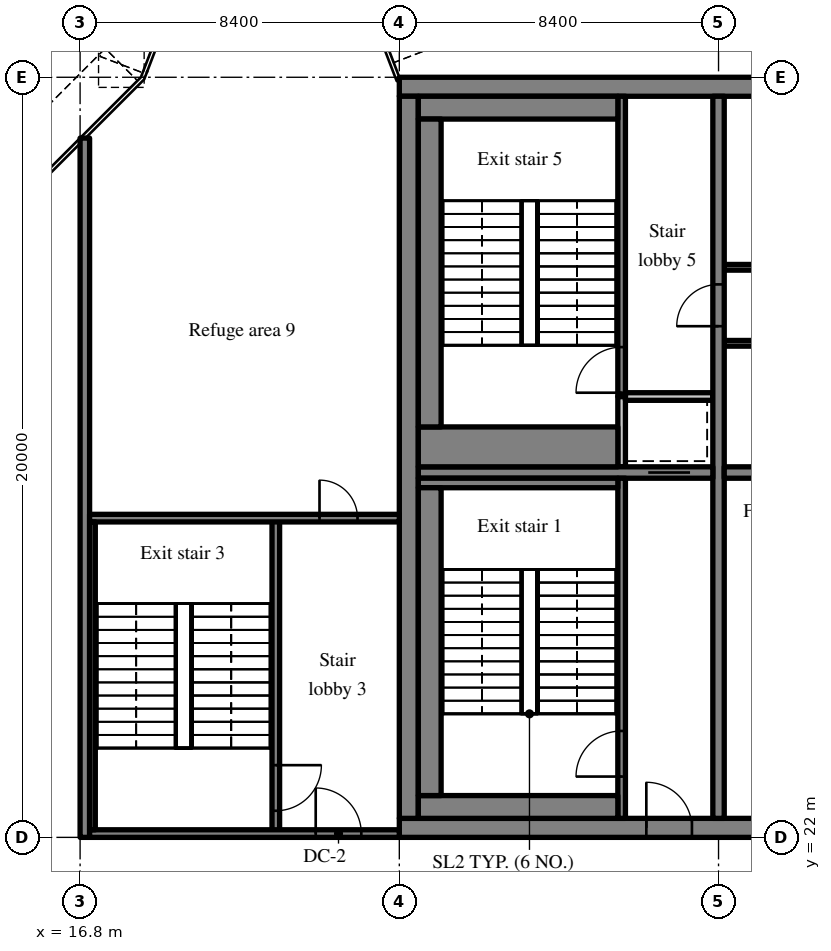
"""IFC4 building model, lengths in metres.
Left out: names, types, materials, properties, quantities, classifications, styles, units other than length and angle.
Written with IfcOpenShell. Run it as: python <this file> out.ifc"""

import sys

from ifc_helpers import new_model, si_unit, direction, frame, frame_2d, origin, place, context, subcontext, project, spatial, rectangle, extrude, source, transform, mapped, element, fill, save


model = new_model("IFC4")
c1 = context("Model", 3, precision=1e-05, world=origin(), true_north=direction((0.0, 1.0)))
c2 = subcontext(c1, "Body", "Model", "MODEL_VIEW")
j1 = project(units=[si_unit("LENGTHUNIT", "METRE"), si_unit("PLANEANGLEUNIT", "RADIAN")], contexts=[c1])
p1 = place(None, origin())
s1 = spatial("IfcSite", under=j1, at=p1, CompositionType="ELEMENT")
p2 = place(p1, origin())
s2 = spatial("IfcBuilding", under=s1, at=p2, CompositionType="ELEMENT")
p3 = place(p2, frame((0.0, 0.0, 270.1)))
s3 = spatial("IfcBuildingStorey", under=s2, at=p3, CompositionType="ELEMENT", Elevation=270.1)
m1 = source(origin(), c2, "Body", "SweptSolid", [
    extrude(rectangle(XDim=50.4, YDim=0.5, at=frame_2d((25.2, 0.0))), origin(), (0.0, 0.0, 1.0), 7.32),
])
p4 = place(p3, frame((25.2, 22.25, 0.0), z_axis=(0.0, 0.0, 1.0), x_axis=(1.0, 0.0, 0.0)))
e1 = element("IfcWall", 1, at=p4, inside=s3, PredefinedType="SHEAR", context=c2, shape_type="MappedRepresentation", body=[
    mapped(m1, transform((0.0, 0.0, 0.0), scale=1.0)),
])
m2 = source(origin(), c2, "Body", "SweptSolid", [
    extrude(rectangle(XDim=1.2, YDim=2.1, at=frame_2d((0.6, 1.05))), frame((0.0, 0.26, 0.0), z_axis=(0.0, -1.0, 0.0), x_axis=(1.0, 0.0, 0.0)), (0.0, 0.0, 1.0), 0.52),
])
p5 = place(p4, frame((22.275, 0.0, 0.0)))
e2 = element("IfcOpeningElement", 2, at=p5, cuts=e1, PredefinedType="OPENING", context=c2, shape_type="MappedRepresentation", body=[
    mapped(m2, transform((0.0, 0.0, 0.0), scale=1.0)),
])
m3 = source(origin(), c2, "Body", "SweptSolid", [
    extrude(rectangle(XDim=0.9, YDim=2.1, at=frame_2d((0.45, 1.05))), frame((0.0, 0.26, 0.0), z_axis=(0.0, -1.0, 0.0), x_axis=(1.0, 0.0, 0.0)), (0.0, 0.0, 1.0), 0.52),
])
p6 = place(p4, frame((15.75, 0.0, 0.0)))
e3 = element("IfcOpeningElement", 3, at=p6, cuts=e1, PredefinedType="OPENING", context=c2, shape_type="MappedRepresentation", body=[
    mapped(m3, transform((0.0, 0.0, 0.0), scale=1.0)),
])
p7 = place(p4, frame((18.75, 0.0, 0.0)))
e4 = element("IfcOpeningElement", 4, at=p7, cuts=e1, PredefinedType="OPENING", context=c2, shape_type="MappedRepresentation", body=[
    mapped(m3, transform((0.0, 0.0, 0.0), scale=1.0)),
])
p8 = place(p4, frame((11.175, 0.0, 0.0)))
e5 = element("IfcOpeningElement", 5, at=p8, cuts=e1, PredefinedType="OPENING", context=c2, shape_type="MappedRepresentation", body=[
    mapped(m3, transform((0.0, 0.0, 0.0), scale=1.0)),
])
m4 = source(origin(), c2, "Body", "SweptSolid", [
    extrude(rectangle(XDim=1.8, YDim=2.1, at=frame_2d((0.9, 1.05))), frame((0.0, 0.26, 0.0), z_axis=(0.0, -1.0, 0.0), x_axis=(1.0, 0.0, 0.0)), (0.0, 0.0, 1.0), 0.52),
])
p9 = place(p4, frame((32.7, 0.0, 0.0)))
e6 = element("IfcOpeningElement", 6, at=p9, cuts=e1, PredefinedType="OPENING", context=c2, shape_type="MappedRepresentation", body=[
    mapped(m4, transform((0.0, 0.0, 0.0), scale=1.0)),
])
p10 = place(p4, frame((6.5, 0.0, 0.0)))
e7 = element("IfcOpeningElement", 7, at=p10, cuts=e1, PredefinedType="OPENING", context=c2, shape_type="MappedRepresentation", body=[
    mapped(m2, transform((0.0, 0.0, 0.0), scale=1.0)),
])
p11 = place(p4, frame((47.975, 0.0, 0.0)))
e8 = element("IfcOpeningElement", 8, at=p11, cuts=e1, PredefinedType="OPENING", context=c2, shape_type="MappedRepresentation", body=[
    mapped(m2, transform((0.0, 0.0, 0.0), scale=1.0)),
])
p12 = place(p3, frame((25.2, 41.75, 0.0), z_axis=(0.0, 0.0, 1.0), x_axis=(1.0, 0.0, 0.0)))
e9 = element("IfcWall", 9, at=p12, inside=s3, PredefinedType="SHEAR", context=c2, shape_type="MappedRepresentation", body=[
    mapped(m1, transform((0.0, 0.0, 0.0), scale=1.0)),
])
m5 = source(origin(), c2, "Body", "SweptSolid", [
    extrude(rectangle(XDim=19.0, YDim=0.5, at=frame_2d((9.5, 0.0))), origin(), (0.0, 0.0, 1.0), 7.32),
])
p13 = place(p3, frame((25.45, 22.5, 0.0), z_axis=(0.0, 0.0, 1.0), x_axis=(0.0, 1.0, 0.0)))
e10 = element("IfcWall", 10, at=p13, inside=s3, PredefinedType="SHEAR", context=c2, shape_type="MappedRepresentation", body=[
    mapped(m5, transform((0.0, 0.0, 0.0), scale=1.0)),
])
m6 = source(origin(), c2, "Body", "SweptSolid", [
    extrude(rectangle(XDim=19.0, YDim=0.3, at=frame_2d((9.5, 0.0))), origin(), (0.0, 0.0, 1.0), 7.32),
])
p14 = place(p3, frame((33.6, 22.5, 0.0), z_axis=(0.0, 0.0, 1.0), x_axis=(0.0, 1.0, 0.0)))
e11 = element("IfcWall", 11, at=p14, inside=s3, PredefinedType="SHEAR", context=c2, shape_type="MappedRepresentation", body=[
    mapped(m6, transform((0.0, 0.0, 0.0), scale=1.0)),
])
m7 = source(origin(), c2, "Body", "SweptSolid", [
    extrude(rectangle(XDim=1.1, YDim=2.1, at=frame_2d((0.55, 1.05))), frame((0.0, 0.16, 0.0), z_axis=(0.0, -1.0, 0.0), x_axis=(1.0, 0.0, 0.0)), (0.0, 0.0, 1.0), 0.32),
])
p15 = place(p14, frame((12.95, 0.0, 0.0)))
e12 = element("IfcOpeningElement", 12, at=p15, cuts=e11, PredefinedType="OPENING", context=c2, shape_type="MappedRepresentation", body=[
    mapped(m7, transform((0.0, 0.0, 0.0), scale=1.0)),
])
m8 = source(origin(), c2, "Body", "SweptSolid", [
    extrude(rectangle(XDim=7.75, YDim=0.3, at=frame_2d((3.875, 0.0))), origin(), (0.0, 0.0, 1.0), 7.32),
])
p16 = place(p3, frame((25.7, 31.6, 0.0), z_axis=(0.0, 0.0, 1.0), x_axis=(1.0, 0.0, 0.0)))
e13 = element("IfcWall", 13, at=p16, inside=s3, PredefinedType="SHEAR", context=c2, shape_type="MappedRepresentation", body=[
    mapped(m8, transform((0.0, 0.0, 0.0), scale=1.0)),
])
p17 = place(p16, frame((6.05, 0.0, 0.0)))
e14 = element("IfcOpeningElement", 14, at=p17, cuts=e13, PredefinedType="OPENING", context=c2, shape_type="MappedRepresentation", body=[
    mapped(m7, transform((0.0, 0.0, 0.0), scale=1.0)),
])
m9 = source(origin(), c2, "Body", "SweptSolid", [
    extrude(rectangle(XDim=16.5, YDim=0.3, at=frame_2d((8.25, 0.0))), origin(), (0.0, 0.0, 1.0), 7.32),
])
p18 = place(p3, frame((33.75, 31.6, 0.0), z_axis=(0.0, 0.0, 1.0), x_axis=(1.0, 0.0, 0.0)))
e15 = element("IfcWall", 15, at=p18, inside=s3, PredefinedType="SHEAR", context=c2, shape_type="MappedRepresentation", body=[
    mapped(m9, transform((0.0, 0.0, 0.0), scale=1.0)),
])
m10 = source(origin(), c2, "Body", "SweptSolid", [
    extrude(rectangle(XDim=1.0, YDim=2.1, at=frame_2d((0.5, 1.05))), frame((0.0, 0.16, 0.0), z_axis=(0.0, -1.0, 0.0), x_axis=(1.0, 0.0, 0.0)), (0.0, 0.0, 1.0), 0.32),
])
p19 = place(p18, frame((14.875, 0.0, 0.0)))
e16 = element("IfcOpeningElement", 16, at=p19, cuts=e15, PredefinedType="OPENING", context=c2, shape_type="MappedRepresentation", body=[
    mapped(m10, transform((0.0, 0.0, 0.0), scale=1.0)),
])
m11 = source(origin(), c2, "Body", "SweptSolid", [
    extrude(rectangle(XDim=18.4, YDim=0.25, at=frame_2d((9.2, 0.0))), origin(), (0.0, 0.0, 1.0), 7.32),
])
p20 = place(p3, frame((16.925, 22.0, 0.0), z_axis=(0.0, 0.0, 1.0), x_axis=(0.0, 1.0, 0.0)))
e17 = element("IfcWall", 17, at=p20, inside=s3, PredefinedType="SHEAR", context=c2, shape_type="MappedRepresentation", body=[
    mapped(m11, transform((0.0, 0.0, 0.0), scale=1.0)),
])
m12 = source(origin(), c2, "Body", "SweptSolid", [
    extrude(rectangle(XDim=14.25, YDim=0.15, at=frame_2d((7.125, 0.0))), origin(), (0.0, 0.0, 1.0), 7.32),
])
p21 = place(p3, frame((33.75, 35.0, 0.0), z_axis=(0.0, 0.0, 1.0), x_axis=(1.0, 0.0, 0.0)))
e18 = element("IfcWall", 18, at=p21, inside=s3, PredefinedType="PARTITIONING", context=c2, shape_type="MappedRepresentation", body=[
    mapped(m12, transform((0.0, 0.0, 0.0), scale=1.0)),
])
m13 = source(origin(), c2, "Body", "SweptSolid", [
    extrude(rectangle(XDim=0.9, YDim=2.1, at=frame_2d((0.45, 1.05))), frame((0.0, 0.085, 0.0), z_axis=(0.0, -1.0, 0.0), x_axis=(1.0, 0.0, 0.0)), (0.0, 0.0, 1.0), 0.17),
])
p22 = place(p21, frame((2.031, 0.0, 0.0)))
e19 = element("IfcOpeningElement", 19, at=p22, cuts=e18, PredefinedType="OPENING", context=c2, shape_type="MappedRepresentation", body=[
    mapped(m13, transform((0.0, 0.0, 0.0), scale=1.0)),
])
p23 = place(p21, frame((9.118, 0.0, 0.0)))
e20 = element("IfcOpeningElement", 20, at=p23, cuts=e18, PredefinedType="OPENING", context=c2, shape_type="MappedRepresentation", body=[
    mapped(m13, transform((0.0, 0.0, 0.0), scale=1.0)),
])
m14 = source(origin(), c2, "Body", "SweptSolid", [
    extrude(rectangle(XDim=16.5, YDim=0.15, at=frame_2d((8.25, 0.0))), origin(), (0.0, 0.0, 1.0), 7.32),
])
p24 = place(p3, frame((33.75, 37.0, 0.0), z_axis=(0.0, 0.0, 1.0), x_axis=(1.0, 0.0, 0.0)))
e21 = element("IfcWall", 21, at=p24, inside=s3, PredefinedType="PARTITIONING", context=c2, shape_type="MappedRepresentation", body=[
    mapped(m14, transform((0.0, 0.0, 0.0), scale=1.0)),
])
p25 = place(p24, frame((3.262, 0.0, 0.0)))
e22 = element("IfcOpeningElement", 22, at=p25, cuts=e21, PredefinedType="OPENING", context=c2, shape_type="MappedRepresentation", body=[
    mapped(m13, transform((0.0, 0.0, 0.0), scale=1.0)),
])
p26 = place(p24, frame((8.212, 0.0, 0.0)))
e23 = element("IfcOpeningElement", 23, at=p26, cuts=e21, PredefinedType="OPENING", context=c2, shape_type="MappedRepresentation", body=[
    mapped(m13, transform((0.0, 0.0, 0.0), scale=1.0)),
])
p27 = place(p24, frame((11.512, 0.0, 0.0)))
e24 = element("IfcOpeningElement", 24, at=p27, cuts=e21, PredefinedType="OPENING", context=c2, shape_type="MappedRepresentation", body=[
    mapped(m13, transform((0.0, 0.0, 0.0), scale=1.0)),
])
p28 = place(p24, frame((14.813, 0.0, 0.0)))
e25 = element("IfcOpeningElement", 25, at=p28, cuts=e21, PredefinedType="OPENING", context=c2, shape_type="MappedRepresentation", body=[
    mapped(m13, transform((0.0, 0.0, 0.0), scale=1.0)),
])
m15 = source(origin(), c2, "Body", "SweptSolid", [
    extrude(rectangle(XDim=8.95, YDim=0.2, at=frame_2d((4.475, 0.0))), origin(), (0.0, 0.0, 1.0), 7.32),
])
p29 = place(p3, frame((31.05, 22.5, 0.0), z_axis=(0.0, 0.0, 1.0), x_axis=(0.0, 1.0, 0.0)))
e26 = element("IfcWall", 26, at=p29, inside=s3, PredefinedType="SOLIDWALL", context=c2, shape_type="MappedRepresentation", body=[
    mapped(m15, transform((0.0, 0.0, 0.0), scale=1.0)),
])
m16 = source(origin(), c2, "Body", "SweptSolid", [
    extrude(rectangle(XDim=1.2, YDim=2.1, at=frame_2d((0.6, 1.05))), frame((0.0, 0.11, 0.0), z_axis=(0.0, -1.0, 0.0), x_axis=(1.0, 0.0, 0.0)), (0.0, 0.0, 1.0), 0.22),
])
p30 = place(p29, frame((1.1, 0.0, 0.0)))
e27 = element("IfcOpeningElement", 27, at=p30, cuts=e26, PredefinedType="OPENING", context=c2, shape_type="MappedRepresentation", body=[
    mapped(m16, transform((0.0, 0.0, 0.0), scale=1.0)),
])
m17 = source(origin(), c2, "Body", "SweptSolid", [
    extrude(rectangle(XDim=1.85, YDim=0.2, at=frame_2d((0.925, 0.0))), origin(), (0.0, 0.0, 1.0), 7.32),
])
p31 = place(p3, frame((31.05, 31.75, 0.0), z_axis=(0.0, 0.0, 1.0), x_axis=(0.0, 1.0, 0.0)))
e28 = element("IfcWall", 28, at=p31, inside=s3, PredefinedType="SOLIDWALL", context=c2, shape_type="MappedRepresentation", body=[
    mapped(m17, transform((0.0, 0.0, 0.0), scale=1.0)),
])
m18 = source(origin(), c2, "Body", "SweptSolid", [
    extrude(rectangle(XDim=2.3, YDim=0.2, at=frame_2d((1.15, 0.0))), origin(), (0.0, 0.0, 1.0), 7.32),
])
p32 = place(p3, frame((31.15, 33.6, 0.0), z_axis=(0.0, 0.0, 1.0), x_axis=(1.0, 0.0, 0.0)))
e29 = element("IfcWall", 29, at=p32, inside=s3, PredefinedType="SOLIDWALL", context=c2, shape_type="MappedRepresentation", body=[
    mapped(m18, transform((0.0, 0.0, 0.0), scale=1.0)),
])
m19 = source(origin(), c2, "Body", "SweptSolid", [
    extrude(rectangle(XDim=7.9, YDim=0.2, at=frame_2d((3.95, 0.0))), origin(), (0.0, 0.0, 1.0), 7.32),
])
p33 = place(p3, frame((31.05, 33.6, 0.0), z_axis=(0.0, 0.0, 1.0), x_axis=(0.0, 1.0, 0.0)))
e30 = element("IfcWall", 30, at=p33, inside=s3, PredefinedType="SOLIDWALL", context=c2, shape_type="MappedRepresentation", body=[
    mapped(m19, transform((0.0, 0.0, 0.0), scale=1.0)),
])
p34 = place(p33, frame((0.1, 0.0, 0.0)))
e31 = element("IfcOpeningElement", 31, at=p34, cuts=e30, PredefinedType="OPENING", context=c2, shape_type="MappedRepresentation", body=[
    mapped(m16, transform((0.0, 0.0, 0.0), scale=1.0)),
])
m20 = source(origin(), c2, "Body", "SweptSolid", [
    extrude(rectangle(XDim=8.3, YDim=0.2, at=frame_2d((4.15, 0.0))), origin(), (0.0, 0.0, 1.0), 7.32),
])
p35 = place(p3, frame((21.95, 22.1, 0.0), z_axis=(0.0, 0.0, 1.0), x_axis=(0.0, 1.0, 0.0)))
e32 = element("IfcWall", 32, at=p35, inside=s3, PredefinedType="SOLIDWALL", context=c2, shape_type="MappedRepresentation", body=[
    mapped(m20, transform((0.0, 0.0, 0.0), scale=1.0)),
])
p36 = place(p35, frame((0.6, 0.0, 0.0)))
e33 = element("IfcOpeningElement", 33, at=p36, cuts=e32, PredefinedType="OPENING", context=c2, shape_type="MappedRepresentation", body=[
    mapped(m16, transform((0.0, 0.0, 0.0), scale=1.0)),
])
m21 = source(origin(), c2, "Body", "SweptSolid", [
    extrude(rectangle(XDim=8.15, YDim=0.2, at=frame_2d((4.075, 0.0))), origin(), (0.0, 0.0, 1.0), 7.32),
])
p37 = place(p3, frame((17.05, 22.1, 0.0), z_axis=(0.0, 0.0, 1.0), x_axis=(1.0, 0.0, 0.0)))
e34 = element("IfcWall", 34, at=p37, inside=s3, PredefinedType="SOLIDWALL", context=c2, shape_type="MappedRepresentation", body=[
    mapped(m21, transform((0.0, 0.0, 0.0), scale=1.0)),
])
p38 = place(p37, frame((5.95, 0.0, 0.0)))
e35 = element("IfcOpeningElement", 35, at=p38, cuts=e34, PredefinedType="OPENING", context=c2, shape_type="MappedRepresentation", body=[
    mapped(m16, transform((0.0, 0.0, 0.0), scale=1.0)),
])
p39 = place(p3, frame((17.05, 30.4, 0.0), z_axis=(0.0, 0.0, 1.0), x_axis=(1.0, 0.0, 0.0)))
e36 = element("IfcWall", 36, at=p39, inside=s3, PredefinedType="SOLIDWALL", context=c2, shape_type="MappedRepresentation", body=[
    mapped(m21, transform((0.0, 0.0, 0.0), scale=1.0)),
])
m22 = source(origin(), c2, "Body", "SweptSolid", [
    extrude(rectangle(XDim=1.0, YDim=2.1, at=frame_2d((0.5, 1.05))), frame((0.0, 0.11, 0.0), z_axis=(0.0, -1.0, 0.0), x_axis=(1.0, 0.0, 0.0)), (0.0, 0.0, 1.0), 0.22),
])
p40 = place(p39, frame((6.05, 0.0, 0.0)))
e37 = element("IfcOpeningElement", 37, at=p40, cuts=e36, PredefinedType="OPENING", context=c2, shape_type="MappedRepresentation", body=[
    mapped(m22, transform((0.0, 0.0, 0.0), scale=1.0)),
])
m23 = source(origin(), c2, "Body", "SweptSolid", [
    extrude(rectangle(XDim=5.25, YDim=0.6, at=frame_2d((2.625, 0.0))), origin(), (0.0, 0.0, 1.0), 7.32),
])
p41 = place(p3, frame((25.7, 22.8, 0.0), z_axis=(0.0, 0.0, 1.0), x_axis=(1.0, 0.0, 0.0)))
e38 = element("IfcWall", 38, at=p41, inside=s3, PredefinedType="SOLIDWALL", context=c2, shape_type="MappedRepresentation", body=[
    mapped(m23, transform((0.0, 0.0, 0.0), scale=1.0)),
])
m24 = source(origin(), c2, "Body", "SweptSolid", [
    extrude(rectangle(XDim=5.25, YDim=0.25, at=frame_2d((2.625, 0.0))), origin(), (0.0, 0.0, 1.0), 7.32),
])
p42 = place(p3, frame((25.7, 31.325, 0.0), z_axis=(0.0, 0.0, 1.0), x_axis=(1.0, 0.0, 0.0)))
e39 = element("IfcWall", 39, at=p42, inside=s3, PredefinedType="SOLIDWALL", context=c2, shape_type="MappedRepresentation", body=[
    mapped(m24, transform((0.0, 0.0, 0.0), scale=1.0)),
])
m25 = source(origin(), c2, "Body", "SweptSolid", [
    extrude(rectangle(XDim=8.1, YDim=0.6, at=frame_2d((4.05, 0.0))), origin(), (0.0, 0.0, 1.0), 7.32),
])
p43 = place(p3, frame((26.0, 23.1, 0.0), z_axis=(0.0, 0.0, 1.0), x_axis=(0.0, 1.0, 0.0)))
e40 = element("IfcWall", 40, at=p43, inside=s3, PredefinedType="SOLIDWALL", context=c2, shape_type="MappedRepresentation", body=[
    mapped(m25, transform((0.0, 0.0, 0.0), scale=1.0)),
])
m26 = source(origin(), c2, "Body", "SweptSolid", [
    extrude(rectangle(XDim=8.1, YDim=0.15, at=frame_2d((4.05, 0.0))), origin(), (0.0, 0.0, 1.0), 7.32),
])
p44 = place(p3, frame((17.125, 22.2, 0.0), z_axis=(0.0, 0.0, 1.0), x_axis=(0.0, 1.0, 0.0)))
e41 = element("IfcWall", 41, at=p44, inside=s3, PredefinedType="SOLIDWALL", context=c2, shape_type="MappedRepresentation", body=[
    mapped(m26, transform((0.0, 0.0, 0.0), scale=1.0)),
])
p45 = place(p3, frame((25.7, 41.2, 0.0), z_axis=(0.0, 0.0, 1.0), x_axis=(1.0, 0.0, 0.0)))
e42 = element("IfcWall", 42, at=p45, inside=s3, PredefinedType="SOLIDWALL", context=c2, shape_type="MappedRepresentation", body=[
    mapped(m23, transform((0.0, 0.0, 0.0), scale=1.0)),
])
m27 = source(origin(), c2, "Body", "SweptSolid", [
    extrude(rectangle(XDim=5.25, YDim=1.05, at=frame_2d((2.625, 0.0))), origin(), (0.0, 0.0, 1.0), 7.32),
])
p46 = place(p3, frame((25.7, 32.275, 0.0), z_axis=(0.0, 0.0, 1.0), x_axis=(1.0, 0.0, 0.0)))
e43 = element("IfcWall", 43, at=p46, inside=s3, PredefinedType="SOLIDWALL", context=c2, shape_type="MappedRepresentation", body=[
    mapped(m27, transform((0.0, 0.0, 0.0), scale=1.0)),
])
p47 = place(p3, frame((26.0, 32.8, 0.0), z_axis=(0.0, 0.0, 1.0), x_axis=(0.0, 1.0, 0.0)))
e44 = element("IfcWall", 44, at=p47, inside=s3, PredefinedType="SOLIDWALL", context=c2, shape_type="MappedRepresentation", body=[
    mapped(m25, transform((0.0, 0.0, 0.0), scale=1.0)),
])
m28 = source(origin(), c2, "Body", "SweptSolid", [
    extrude(rectangle(XDim=1.2, YDim=2.1, at=frame_2d((0.6, 1.05))), frame((0.0, 0.025, 0.0), z_axis=(0.0, -1.0, 0.0), x_axis=(1.0, 0.0, 0.0)), (0.0, 0.0, 1.0), 0.05),
])
p48 = place(p30, origin())
e45 = element("IfcDoor", 45, at=p48, inside=s3, OperationType="SINGLE_SWING_LEFT", PredefinedType="DOOR", context=c2, shape_type="MappedRepresentation", body=[
    mapped(m28, transform((0.0, 0.0, 0.0), scale=1.0)),
])
fill(e27, e45)
m29 = source(origin(), c2, "Body", "SweptSolid", [
    extrude(rectangle(XDim=1.2, YDim=2.1, at=frame_2d((0.6, 1.05))), frame((0.0, 0.175, 0.0), z_axis=(0.0, -1.0, 0.0), x_axis=(1.0, 0.0, 0.0)), (0.0, 0.0, 1.0), 0.05),
])
p49 = place(p10, origin())
e46 = element("IfcDoor", 46, at=p49, inside=s3, OperationType="SINGLE_SWING_LEFT", PredefinedType="DOOR", context=c2, shape_type="MappedRepresentation", body=[
    mapped(m29, transform((0.0, 0.0, 0.0), scale=1.0)),
])
fill(e7, e46)
m30 = source(origin(), c2, "Body", "SweptSolid", [
    extrude(rectangle(XDim=1.1, YDim=2.1, at=frame_2d((0.55, 1.05))), frame((0.0, 0.025, 0.0), z_axis=(0.0, -1.0, 0.0), x_axis=(1.0, 0.0, 0.0)), (0.0, 0.0, 1.0), 0.05),
])
p50 = place(p17, origin())
e47 = element("IfcDoor", 47, at=p50, inside=s3, OperationType="SLIDING_TO_LEFT", PredefinedType="DOOR", context=c2, shape_type="MappedRepresentation", body=[
    mapped(m30, transform((0.0, 0.0, 0.0), scale=1.0)),
])
fill(e14, e47)
p51 = place(p34, origin())
e48 = element("IfcDoor", 48, at=p51, inside=s3, OperationType="SINGLE_SWING_LEFT", PredefinedType="DOOR", context=c2, shape_type="MappedRepresentation", body=[
    mapped(m28, transform((0.0, 0.0, 0.0), scale=1.0)),
])
fill(e31, e48)
p52 = place(p36, origin())
e49 = element("IfcDoor", 49, at=p52, inside=s3, OperationType="SINGLE_SWING_RIGHT", PredefinedType="DOOR", context=c2, shape_type="MappedRepresentation", body=[
    mapped(m28, transform((0.0, 0.0, 0.0), scale=1.0)),
])
fill(e33, e49)
p53 = place(p38, origin())
e50 = element("IfcDoor", 50, at=p53, inside=s3, OperationType="SINGLE_SWING_LEFT", PredefinedType="DOOR", context=c2, shape_type="MappedRepresentation", body=[
    mapped(m28, transform((0.0, 0.0, 0.0), scale=1.0)),
])
fill(e35, e50)
m31 = source(origin(), c2, "Body", "SweptSolid", [
    extrude(rectangle(XDim=1.0, YDim=2.1, at=frame_2d((0.5, 1.05))), frame((0.0, 0.025, 0.0), z_axis=(0.0, -1.0, 0.0), x_axis=(1.0, 0.0, 0.0)), (0.0, 0.0, 1.0), 0.05),
])
p54 = place(p40, origin())
e51 = element("IfcDoor", 51, at=p54, inside=s3, OperationType="SINGLE_SWING_LEFT", PredefinedType="DOOR", context=c2, shape_type="MappedRepresentation", body=[
    mapped(m31, transform((0.0, 0.0, 0.0), scale=1.0)),
])
fill(e37, e51)
p55 = place(p15, origin())
e52 = element("IfcDoor", 52, at=p55, inside=s3, OperationType="SINGLE_SWING_LEFT", PredefinedType="DOOR", context=c2, shape_type="MappedRepresentation", body=[
    mapped(m30, transform((0.0, 0.0, 0.0), scale=1.0)),
])
fill(e12, e52)
save(model, sys.argv[1])
